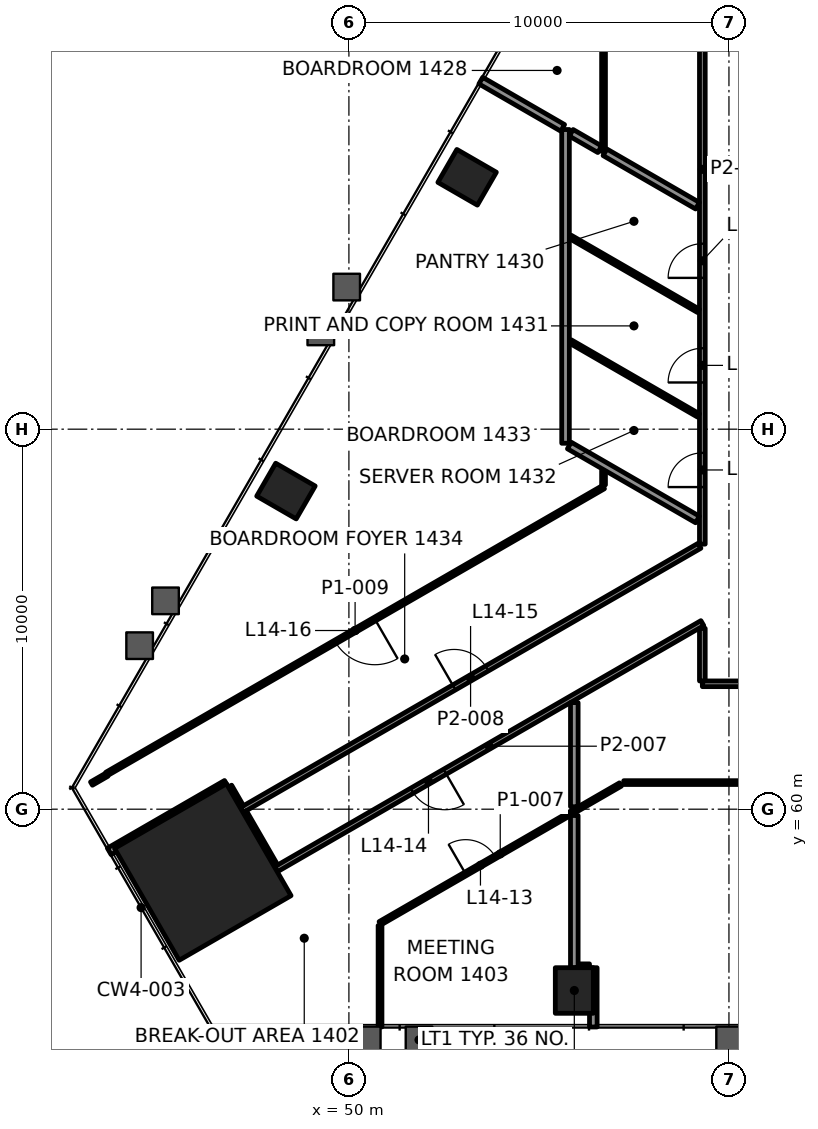
"""IFC4 building model, lengths in metres.
Left out: names, types, materials, properties, quantities, classifications, styles, units other than length and angle.
Written with IfcOpenShell. Run it as: python <this file> out.ifc"""

import sys

from ifc_helpers import new_model, si_unit, direction, frame, frame_2d, origin, origin_2d, place, context, subcontext, project, spatial, rectangle, extrude, element, fill, save


model = new_model("IFC4")
c1 = context("Model", 3, precision=1e-05, world=origin(), true_north=direction((0.0, 1.0)))
c2 = subcontext(c1, "Body", "Model", "MODEL_VIEW")
j1 = project(units=[si_unit("LENGTHUNIT", "METRE"), si_unit("PLANEANGLEUNIT", "RADIAN")], contexts=[c1])
p1 = place(None, origin())
s1 = spatial("IfcSite", under=j1, at=p1, CompositionType="ELEMENT")
p2 = place(p1, origin())
s2 = spatial("IfcBuilding", under=s1, at=p2, CompositionType="ELEMENT")
p3 = place(p2, frame((0.0, 0.0, 65.2)))
s3 = spatial("IfcBuildingStorey", under=s2, at=p3, CompositionType="ELEMENT", Elevation=65.2)
p4 = place(p3, frame((46.156, 58.347, 0.0), z_axis=(0.0, 0.0, 1.0), x_axis=(0.5, -0.866025403784, 0.0)))
e1 = element("IfcColumn", 1, at=p4, inside=s3, PredefinedType="COLUMN", context=c2, shape_type="SweptSolid", body=[
    extrude(rectangle(XDim=3.4, YDim=3.4, at=origin_2d()), origin(), (0.0, 0.0, 1.0), 4.2),
])
for number, where, z_axis, x_axis in (
    (2, (55.931, 55.229, -0.0), (0.0, 0.0, 1.0), (1.0, 0.0, 0.0)),
    (3, (53.111, 76.628, -0.0), (0.0, 0.0, 1.0), (-0.5, -0.866, 0.0)),
    (4, (48.343, 68.371, -0.0), (0.0, 0.0, 1.0), (-0.5, -0.866, 0.0)),
):
    element("IfcColumn", number, at=place(p3, frame(where, z_axis=z_axis, x_axis=x_axis)), inside=s3, PredefinedType="COLUMN", context=c2, shape_type="SweptSolid", body=[
        extrude(rectangle(XDim=1.0, YDim=1.2, at=origin_2d()), origin(), (0.0, 0.0, 1.0), 4.2),
    ])
p5 = place(p3, frame((56.031, 55.829, 0.0), z_axis=(0.0, 0.0, 1.0), x_axis=(1.0, 0.0, 0.0)))
e5 = element("IfcWall", 5, at=p5, inside=s3, PredefinedType="PARTITIONING", context=c2, shape_type="SweptSolid", body=[
    extrude(rectangle(XDim=0.3, YDim=0.2, at=frame_2d((0.15, 0.0))), origin(), (0.0, 0.0, 1.0), 3.4),
])
p6 = place(p3, frame((57.232, 60.7, 0.0), z_axis=(0.0, 0.0, 1.0), x_axis=(1.0, 0.0, 0.0)))
e6 = element("IfcWall", 6, at=p6, inside=s3, PredefinedType="PARTITIONING", context=c2, shape_type="SweptSolid", body=[
    extrude(rectangle(XDim=15.385, YDim=0.1, at=frame_2d((7.692, 0.0))), origin(), (0.0, 0.0, 1.0), 3.4),
])
p7 = place(p6, frame((7.192, 0.0, 0.0)))
e7 = element("IfcOpeningElement", 7, at=p7, cuts=e6, PredefinedType="OPENING", context=c2, shape_type="SweptSolid", body=[
    extrude(rectangle(XDim=1.0, YDim=2.1, at=frame_2d((0.5, 1.05))), frame((0.0, 0.06, 0.0), z_axis=(0.0, -1.0, 0.0), x_axis=(1.0, 0.0, 0.0)), (0.0, 0.0, 1.0), 0.12),
])
p8 = place(p3, frame((90.699, 63.3, 0.0), z_axis=(0.0, 0.0, 1.0), x_axis=(-1.0, 0.0, 0.0)))
e8 = element("IfcWall", 8, at=p8, inside=s3, PredefinedType="PARTITIONING", context=c2, shape_type="SweptSolid", body=[
    extrude(rectangle(XDim=31.399, YDim=0.15, at=frame_2d((15.7, 0.0))), origin(), (0.0, 0.0, 1.0), 3.4),
])
p9 = place(p8, frame((4.968, 0.0, 0.0)))
e9 = element("IfcOpeningElement", 9, at=p9, cuts=e8, PredefinedType="OPENING", context=c2, shape_type="SweptSolid", body=[
    extrude(rectangle(XDim=1.2, YDim=2.1, at=frame_2d((0.6, 1.05))), frame((0.0, 0.085, 0.0), z_axis=(0.0, -1.0, 0.0), x_axis=(1.0, 0.0, 0.0)), (0.0, 0.0, 1.0), 0.17),
])
p10 = place(p8, frame((13.908, 0.0, 0.0)))
e10 = element("IfcOpeningElement", 10, at=p10, cuts=e8, PredefinedType="OPENING", context=c2, shape_type="SweptSolid", body=[
    extrude(rectangle(XDim=1.2, YDim=2.1, at=frame_2d((0.6, 1.05))), frame((0.0, 0.085, 0.0), z_axis=(0.0, -1.0, 0.0), x_axis=(1.0, 0.0, 0.0)), (0.0, 0.0, 1.0), 0.17),
])
p11 = place(p8, frame((24.14, 0.0, 0.0)))
e11 = element("IfcOpeningElement", 11, at=p11, cuts=e8, PredefinedType="OPENING", context=c2, shape_type="SweptSolid", body=[
    extrude(rectangle(XDim=1.0, YDim=2.1, at=frame_2d((0.5, 1.05))), frame((0.0, 0.085, 0.0), z_axis=(0.0, -1.0, 0.0), x_axis=(1.0, 0.0, 0.0)), (0.0, 0.0, 1.0), 0.17),
])
p12 = place(p3, frame((50.819, 56.998, 0.0), z_axis=(0.0, 0.0, 1.0), x_axis=(0.866023631393, 0.50000306986, 0.0)))
e12 = element("IfcWall", 12, at=p12, inside=s3, PredefinedType="PARTITIONING", context=c2, shape_type="SweptSolid", body=[
    extrude(rectangle(XDim=7.305, YDim=0.1, at=frame_2d((3.653, 0.0))), origin(), (0.0, 0.0, 1.0), 3.4),
])
p13 = place(p12, frame((2.602, 0.0, 0.0)))
e13 = element("IfcOpeningElement", 13, at=p13, cuts=e12, PredefinedType="OPENING", context=c2, shape_type="SweptSolid", body=[
    extrude(rectangle(XDim=0.9, YDim=2.1, at=frame_2d((0.45, 1.05))), frame((0.0, 0.06, 0.0), z_axis=(0.0, -1.0, 0.0), x_axis=(1.0, 0.0, 0.0)), (0.0, 0.0, 1.0), 0.12),
])
p14 = place(p3, frame((59.3, 64.896, 0.0), z_axis=(0.0, 0.0, 1.0), x_axis=(-0.86602302899, -0.500004113243, 0.0)))
e14 = element("IfcWall", 14, at=p14, inside=s3, PredefinedType="PARTITIONING", context=c2, shape_type="SweptSolid", body=[
    extrude(rectangle(XDim=12.956, YDim=0.15, at=frame_2d((6.478, 0.0))), origin(), (0.0, 0.0, 1.0), 3.247),
])
p15 = place(p14, frame((7.821, 0.0, 0.0)))
e15 = element("IfcOpeningElement", 15, at=p15, cuts=e14, PredefinedType="OPENING", context=c2, shape_type="SweptSolid", body=[
    extrude(rectangle(XDim=1.0, YDim=2.1, at=frame_2d((0.5, 1.05))), frame((0.0, 0.085, 0.0), z_axis=(0.0, -1.0, 0.0), x_axis=(1.0, 0.0, 0.0)), (0.0, 0.0, 1.0), 0.17),
])
p16 = place(p3, frame((47.178, 59.976, 0.0), z_axis=(0.0, 0.0, 1.0), x_axis=(0.866019280802, 0.500010605167, 0.0)))
e16 = element("IfcWall", 16, at=p16, inside=s3, PredefinedType="PARTITIONING", context=c2, shape_type="SweptSolid", body=[
    extrude(rectangle(XDim=13.91, YDim=0.15, at=frame_2d((6.955, 0.0))), origin(), (0.0, 0.0, 1.0), 3.4),
])
p17 = place(p16, frame((6.455, 0.0, 0.0)))
e17 = element("IfcOpeningElement", 17, at=p17, cuts=e16, PredefinedType="OPENING", context=c2, shape_type="SweptSolid", body=[
    extrude(rectangle(XDim=1.0, YDim=2.1, at=frame_2d((0.5, 1.05))), frame((0.0, 0.085, 0.0), z_axis=(0.0, -1.0, 0.0), x_axis=(1.0, 0.0, 0.0)), (0.0, 0.0, 1.0), 0.17),
])
p18 = place(p3, frame((43.695, 58.888, 0.0), z_axis=(0.0, 0.0, 1.0), x_axis=(0.866031398331, 0.499989616998, 0.0)))
e18 = element("IfcWall", 18, at=p18, inside=s3, PredefinedType="PARTITIONING", context=c2, shape_type="SweptSolid", body=[
    extrude(rectangle(XDim=3.56, YDim=0.2, at=frame_2d((1.78, 0.0))), origin(), (0.0, 0.0, 1.0), 3.4),
])
p19 = place(p3, frame((43.226, 60.674, 0.0), z_axis=(0.0, 0.0, 1.0), x_axis=(0.866073792734, 0.499916178513, 0.0)))
e19 = element("IfcWall", 19, at=p19, inside=s3, PredefinedType="PARTITIONING", context=c2, shape_type="SweptSolid", body=[
    extrude(rectangle(XDim=0.473, YDim=0.1, at=frame_2d((0.236, 0.0))), origin(), (0.0, 0.0, 1.0), 3.4),
])
p20 = place(p3, frame((56.7, 68.476, 0.0), z_axis=(0.0, 0.0, 1.0), x_axis=(-0.866026152489, -0.499998703203, 0.0)))
e20 = element("IfcWall", 20, at=p20, inside=s3, PredefinedType="PARTITIONING", context=c2, shape_type="SweptSolid", body=[
    extrude(rectangle(XDim=15.096, YDim=0.1, at=frame_2d((7.548, 0.0))), origin(), (0.0, 0.0, 1.0), 3.4),
])
p21 = place(p20, frame((6.948, 0.0, 0.0)))
e21 = element("IfcOpeningElement", 21, at=p21, cuts=e20, PredefinedType="OPENING", context=c2, shape_type="SweptSolid", body=[
    extrude(rectangle(XDim=1.2, YDim=2.1, at=frame_2d((0.6, 1.05))), frame((0.0, 0.06, 0.0), z_axis=(0.0, -1.0, 0.0), x_axis=(1.0, 0.0, 0.0)), (0.0, 0.0, 1.0), 0.12),
])
p22 = place(p3, frame((59.3, 63.375, 0.0), z_axis=(0.0, 0.0, 1.0), x_axis=(0.0, 1.0, 0.0)))
e22 = element("IfcWall", 22, at=p22, inside=s3, PredefinedType="PARTITIONING", context=c2, shape_type="SweptSolid", body=[
    extrude(rectangle(XDim=1.385, YDim=0.15, at=frame_2d((0.692, 0.0))), origin(), (0.0, 0.0, 1.0), 3.247),
])
p23 = place(p3, frame((59.3, 66.975, 0.0), z_axis=(0.0, 0.0, 1.0), x_axis=(0.0, 1.0, 0.0)))
e23 = element("IfcWall", 23, at=p23, inside=s3, PredefinedType="PARTITIONING", context=c2, shape_type="SweptSolid", body=[
    extrude(rectangle(XDim=19.725, YDim=0.15, at=frame_2d((9.862, 0.0))), origin(), (0.0, 0.0, 1.0), 3.4),
])
p24 = place(p23, frame((1.502, 0.0, 0.0)))
e24 = element("IfcOpeningElement", 24, at=p24, cuts=e23, PredefinedType="OPENING", context=c2, shape_type="SweptSolid", body=[
    extrude(rectangle(XDim=0.9, YDim=2.1, at=frame_2d((0.45, 1.05))), frame((0.0, 0.085, 0.0), z_axis=(0.0, -1.0, 0.0), x_axis=(1.0, 0.0, 0.0)), (0.0, 0.0, 1.0), 0.17),
])
p25 = place(p23, frame((4.254, 0.0, 0.0)))
e25 = element("IfcOpeningElement", 25, at=p25, cuts=e23, PredefinedType="OPENING", context=c2, shape_type="SweptSolid", body=[
    extrude(rectangle(XDim=0.9, YDim=2.1, at=frame_2d((0.45, 1.05))), frame((0.0, 0.085, 0.0), z_axis=(0.0, -1.0, 0.0), x_axis=(1.0, 0.0, 0.0)), (0.0, 0.0, 1.0), 0.17),
])
p26 = place(p23, frame((7.007, 0.0, 0.0)))
e26 = element("IfcOpeningElement", 26, at=p26, cuts=e23, PredefinedType="OPENING", context=c2, shape_type="SweptSolid", body=[
    extrude(rectangle(XDim=0.9, YDim=2.1, at=frame_2d((0.45, 1.05))), frame((0.0, 0.085, 0.0), z_axis=(0.0, -1.0, 0.0), x_axis=(1.0, 0.0, 0.0)), (0.0, 0.0, 1.0), 0.17),
])
p27 = place(p3, frame((56.7, 68.534, 0.0), z_axis=(0.0, 0.0, 1.0), x_axis=(0.0, 1.0, 0.0)))
e27 = element("IfcWall", 27, at=p27, inside=s3, PredefinedType="PARTITIONING", context=c2, shape_type="SweptSolid", body=[
    extrude(rectangle(XDim=0.372, YDim=0.1, at=frame_2d((0.186, 0.0))), origin(), (0.0, 0.0, 1.0), 3.4),
])
p28 = place(p3, frame((56.7, 84.046, 0.0), z_axis=(0.0, 0.0, 1.0), x_axis=(0.0, -1.0, 0.0)))
e28 = element("IfcWall", 28, at=p28, inside=s3, PredefinedType="PARTITIONING", context=c2, shape_type="SweptSolid", body=[
    extrude(rectangle(XDim=6.737, YDim=0.1, at=frame_2d((3.369, 0.0))), origin(), (0.0, 0.0, 1.0), 3.165),
])
p29 = place(p28, frame((2.769, 0.0, 0.0)))
e29 = element("IfcOpeningElement", 29, at=p29, cuts=e28, PredefinedType="OPENING", context=c2, shape_type="SweptSolid", body=[
    extrude(rectangle(XDim=1.2, YDim=2.1, at=frame_2d((0.6, 1.05))), frame((0.0, 0.06, 0.0), z_axis=(0.0, -1.0, 0.0), x_axis=(1.0, 0.0, 0.0)), (0.0, 0.0, 1.0), 0.12),
])
p30 = place(p3, frame((56.431, 54.269, 0.0), z_axis=(0.0, 0.0, 1.0), x_axis=(0.0, 1.0, 0.0)))
e30 = element("IfcWall", 30, at=p30, inside=s3, PredefinedType="PARTITIONING", context=c2, shape_type="SweptSolid", body=[
    extrude(rectangle(XDim=1.56, YDim=0.2, at=frame_2d((0.78, 0.0))), origin(), (0.0, 0.0, 1.0), 3.165),
])
p31 = place(p3, frame((55.931, 55.829, 0.0), z_axis=(0.0, 0.0, 1.0), x_axis=(0.0, 1.0, 0.0)))
e31 = element("IfcWall", 31, at=p31, inside=s3, PredefinedType="PARTITIONING", context=c2, shape_type="SweptSolid", body=[
    extrude(rectangle(XDim=4.005, YDim=0.2, at=frame_2d((2.002, 0.0))), origin(), (0.0, 0.0, 1.0), 3.4),
])
p32 = place(p3, frame((55.7, 69.63, 0.0), z_axis=(0.0, 0.0, 1.0), x_axis=(0.0, 1.0, 0.0)))
e32 = element("IfcWall", 32, at=p32, inside=s3, PredefinedType="PARTITIONING", context=c2, shape_type="SweptSolid", body=[
    extrude(rectangle(XDim=8.256, YDim=0.2, at=frame_2d((4.128, 0.0))), origin(), (0.0, 0.0, 1.0), 3.4),
])
p33 = place(p3, frame((50.819, 54.269, 0.0), z_axis=(0.0, 0.0, 1.0), x_axis=(0.0, 1.0, 0.0)))
e33 = element("IfcWall", 33, at=p33, inside=s3, PredefinedType="PARTITIONING", context=c2, shape_type="SweptSolid", body=[
    extrude(rectangle(XDim=2.671, YDim=0.1, at=frame_2d((1.335, 0.0))), origin(), (0.0, 0.0, 1.0), 3.4),
])
p34 = place(p3, frame((48.039, 58.485, 0.0), z_axis=(0.0, 0.0, 1.0), x_axis=(-0.499949127178, 0.86605477323, 0.0)))
e34 = element("IfcWall", 34, at=p34, inside=s3, PredefinedType="PARTITIONING", context=c2, shape_type="SweptSolid", body=[
    extrude(rectangle(XDim=1.647, YDim=0.2, at=frame_2d((0.824, 0.0))), origin(), (0.0, 0.0, 1.0), 3.247),
])
p35 = place(p3, frame((59.173, 75.881, 0.0), z_axis=(0.0, 0.0, 1.0), x_axis=(-0.866049697453, 0.499957919771, 0.0)))
e35 = element("IfcWall", 35, at=p35, inside=s3, PredefinedType="PARTITIONING", context=c2, shape_type="SweptSolid", body=[
    extrude(rectangle(XDim=2.812, YDim=0.2, at=frame_2d((1.406, 0.0))), origin(), (0.0, 0.0, 1.0), 3.4),
])
p36 = place(p3, frame((59.199, 73.113, 0.0), z_axis=(0.0, 0.0, 1.0), x_axis=(-0.866016482536, 0.500015451737, 0.0)))
e36 = element("IfcWall", 36, at=p36, inside=s3, PredefinedType="PARTITIONING", context=c2, shape_type="SweptSolid", body=[
    extrude(rectangle(XDim=3.895, YDim=0.1, at=frame_2d((1.948, 0.0))), origin(), (0.0, 0.0, 1.0), 3.4),
])
p37 = place(p3, frame((59.199, 70.361, 0.0), z_axis=(0.0, 0.0, 1.0), x_axis=(-0.866043624834, 0.499968438888, 0.0)))
e37 = element("IfcWall", 37, at=p37, inside=s3, PredefinedType="PARTITIONING", context=c2, shape_type="SweptSolid", body=[
    extrude(rectangle(XDim=3.895, YDim=0.1, at=frame_2d((1.947, 0.0))), origin(), (0.0, 0.0, 1.0), 3.4),
])
p38 = place(p3, frame((59.173, 67.623, 0.0), z_axis=(0.0, 0.0, 1.0), x_axis=(-0.866000809756, 0.500042595688, 0.0)))
e38 = element("IfcWall", 38, at=p38, inside=s3, PredefinedType="PARTITIONING", context=c2, shape_type="SweptSolid", body=[
    extrude(rectangle(XDim=3.895, YDim=0.2, at=frame_2d((1.947, 0.0))), origin(), (0.0, 0.0, 1.0), 3.4),
])
p39 = place(p3, frame((55.931, 60.065, 0.0), z_axis=(0.0, 0.0, 1.0), x_axis=(0.0, 1.0, 0.0)))
e39 = element("IfcWall", 39, at=p39, inside=s3, PredefinedType="PARTITIONING", context=c2, shape_type="SweptSolid", body=[
    extrude(rectangle(XDim=2.74, YDim=0.2, at=frame_2d((1.37, 0.0))), origin(), (0.0, 0.0, 1.0), 3.4),
])
p40 = place(p3, frame((47.14, 60.041, 0.0), z_axis=(0.0, 0.0, 1.0), x_axis=(-0.500049599607, 0.865996765544, 0.0)))
e40 = element("IfcWall", 40, at=p40, inside=s3, PredefinedType="PARTITIONING", context=c2, shape_type="SweptSolid", body=[
    extrude(rectangle(XDim=0.625, YDim=0.2, at=frame_2d((0.312, 0.0))), origin(), (0.0, 0.0, 1.0), 3.4),
])
p41 = place(p3, frame((56.6, 77.366, 0.0), z_axis=(0.0, 0.0, 1.0), x_axis=(-0.866101087359, 0.499868889286, 0.0)))
e41 = element("IfcWall", 41, at=p41, inside=s3, PredefinedType="PARTITIONING", context=c2, shape_type="SweptSolid", body=[
    extrude(rectangle(XDim=0.866, YDim=0.2, at=frame_2d((0.433, 0.0))), origin(), (0.0, 0.0, 1.0), 3.4),
])
p42 = place(p3, frame((55.625, 77.929, 0.0), z_axis=(0.0, 0.0, 1.0), x_axis=(-0.86602376425, 0.500002839747, 0.0)))
e42 = element("IfcWall", 42, at=p42, inside=s3, PredefinedType="PARTITIONING", context=c2, shape_type="SweptSolid", body=[
    extrude(rectangle(XDim=2.487, YDim=0.2, at=frame_2d((1.244, 0.0))), origin(), (0.0, 0.0, 1.0), 3.165),
])
p43 = place(p13, origin())
e43 = element("IfcDoor", 43, at=p43, inside=s3, OperationType="SINGLE_SWING_RIGHT", PredefinedType="DOOR", context=c2, shape_type="SweptSolid", body=[
    extrude(rectangle(XDim=0.9, YDim=2.1, at=frame_2d((0.45, 1.05))), frame((0.0, 0.025, 0.0), z_axis=(0.0, -1.0, 0.0), x_axis=(1.0, 0.0, 0.0)), (0.0, 0.0, 1.0), 0.05),
])
fill(e13, e43)
p44 = place(p15, origin())
e44 = element("IfcDoor", 44, at=p44, inside=s3, OperationType="SINGLE_SWING_RIGHT", PredefinedType="DOOR", context=c2, shape_type="SweptSolid", body=[
    extrude(rectangle(XDim=1.0, YDim=2.1, at=frame_2d((0.5, 1.05))), frame((0.0, 0.025, 0.0), z_axis=(0.0, -1.0, 0.0), x_axis=(1.0, 0.0, 0.0)), (0.0, 0.0, 1.0), 0.05),
])
fill(e15, e44)
p45 = place(p17, origin())
e45 = element("IfcDoor", 45, at=p45, inside=s3, OperationType="SINGLE_SWING_LEFT", PredefinedType="DOOR", context=c2, shape_type="SweptSolid", body=[
    extrude(rectangle(XDim=1.0, YDim=2.1, at=frame_2d((0.5, 1.05))), frame((0.0, 0.025, 0.0), z_axis=(0.0, -1.0, 0.0), x_axis=(1.0, 0.0, 0.0)), (0.0, 0.0, 1.0), 0.05),
])
fill(e17, e45)
p46 = place(p21, origin())
e46 = element("IfcDoor", 46, at=p46, inside=s3, OperationType="DOUBLE_DOOR_SINGLE_SWING", PredefinedType="DOOR", context=c2, shape_type="SweptSolid", body=[
    extrude(rectangle(XDim=1.2, YDim=2.1, at=frame_2d((0.6, 1.05))), frame((0.0, 0.025, 0.0), z_axis=(0.0, -1.0, 0.0), x_axis=(1.0, 0.0, 0.0)), (0.0, 0.0, 1.0), 0.05),
])
fill(e21, e46)
p47 = place(p24, origin())
e47 = element("IfcDoor", 47, at=p47, inside=s3, OperationType="SINGLE_SWING_LEFT", PredefinedType="DOOR", context=c2, shape_type="SweptSolid", body=[
    extrude(rectangle(XDim=0.9, YDim=2.1, at=frame_2d((0.45, 1.05))), frame((0.0, 0.025, 0.0), z_axis=(0.0, -1.0, 0.0), x_axis=(1.0, 0.0, 0.0)), (0.0, 0.0, 1.0), 0.05),
])
fill(e24, e47)
p48 = place(p25, origin())
e48 = element("IfcDoor", 48, at=p48, inside=s3, OperationType="SINGLE_SWING_RIGHT", PredefinedType="DOOR", context=c2, shape_type="SweptSolid", body=[
    extrude(rectangle(XDim=0.9, YDim=2.1, at=frame_2d((0.45, 1.05))), frame((0.0, 0.025, 0.0), z_axis=(0.0, -1.0, 0.0), x_axis=(1.0, 0.0, 0.0)), (0.0, 0.0, 1.0), 0.05),
])
fill(e25, e48)
p49 = place(p26, origin())
e49 = element("IfcDoor", 49, at=p49, inside=s3, OperationType="SINGLE_SWING_LEFT", PredefinedType="DOOR", context=c2, shape_type="SweptSolid", body=[
    extrude(rectangle(XDim=0.9, YDim=2.1, at=frame_2d((0.45, 1.05))), frame((0.0, 0.025, 0.0), z_axis=(0.0, -1.0, 0.0), x_axis=(1.0, 0.0, 0.0)), (0.0, 0.0, 1.0), 0.05),
])
fill(e26, e49)
save(model, sys.argv[1])
